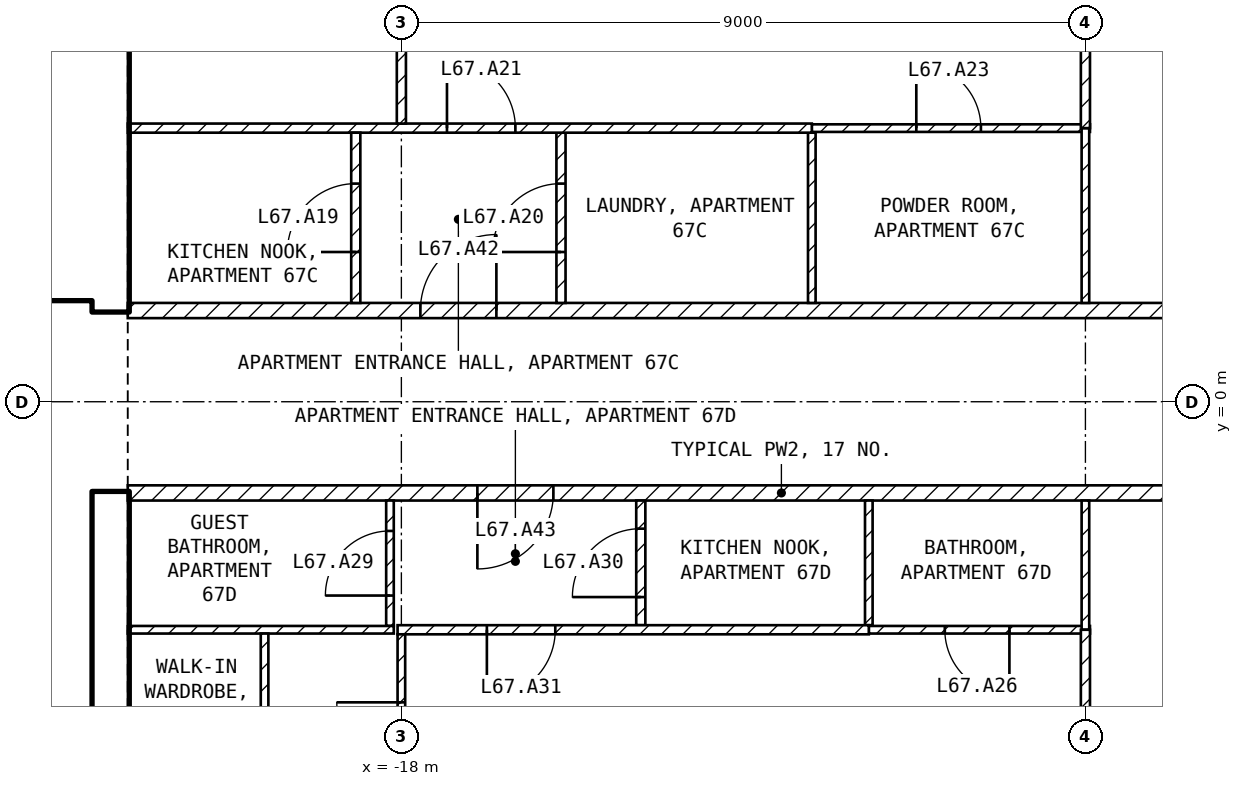
"""IFC4 building model, lengths in metres.
Left out: names, types, materials, properties, quantities, classifications, styles, units other than length and angle.
Written with IfcOpenShell. Run it as: python <this file> out.ifc"""

import sys

from ifc_helpers import new_model, si_unit, direction, frame, frame_2d, origin, place, context, subcontext, project, spatial, rectangle, extrude, element, fill, save


model = new_model("IFC4")
c1 = context("Model", 3, precision=1e-05, world=origin(), true_north=direction((0.0, 1.0)))
c2 = subcontext(c1, "Body", "Model", "MODEL_VIEW")
j1 = project(units=[si_unit("LENGTHUNIT", "METRE"), si_unit("PLANEANGLEUNIT", "RADIAN")], contexts=[c1])
p1 = place(None, origin())
s1 = spatial("IfcSite", under=j1, at=p1, CompositionType="ELEMENT")
p2 = place(p1, origin())
s2 = spatial("IfcBuilding", under=s1, at=p2, CompositionType="ELEMENT")
p3 = place(p2, frame((0.0, 0.0, 264.0)))
s3 = spatial("IfcBuildingStorey", under=s2, at=p3, CompositionType="ELEMENT", Elevation=264.0)
for number, where, z_axis, x_axis in (
    (1, (-21.825, -8.1, 0.0), (0.0, 0.0, 1.0), (0.0, 1.0, 0.0)),
    (2, (-21.825, 1.2, 0.0), (0.0, 0.0, 1.0), (0.0, 1.0, 0.0)),
):
    element("IfcWall", number, at=place(p3, frame(where, z_axis=z_axis, x_axis=x_axis)), inside=s3, PredefinedType="SHEAR", context=c2, shape_type="SweptSolid", body=[
        extrude(rectangle(XDim=6.9, YDim=0.45, at=frame_2d((3.45, 0.0))), origin(), (0.0, 0.0, 1.0), 3.25),
    ])
p4 = place(p3, frame((-33.35, 1.45, 0.0), z_axis=(0.0, 0.0, 1.0), x_axis=(1.0, 0.0, 0.0)))
e3 = element("IfcWall", 3, at=p4, inside=s3, PredefinedType="SOLIDWALL", context=c2, shape_type="SweptSolid", body=[
    extrude(rectangle(XDim=11.3, YDim=0.2, at=frame_2d((5.65, 0.0))), origin(), (0.0, 0.0, 1.0), 3.25),
])
p5 = place(p4, frame((9.55, 0.0, 0.0)))
e4 = element("IfcOpeningElement", 4, at=p5, cuts=e3, PredefinedType="OPENING", context=c2, shape_type="SweptSolid", body=[
    extrude(rectangle(XDim=1.0, YDim=2.1, at=frame_2d((0.5, 1.05))), frame((0.0, 0.11, 0.0), z_axis=(0.0, -1.0, 0.0), x_axis=(1.0, 0.0, 0.0)), (0.0, 0.0, 1.0), 0.22),
])
p6 = place(p4, frame((7.05, 0.0, 0.0)))
e5 = element("IfcOpeningElement", 5, at=p6, cuts=e3, PredefinedType="OPENING", context=c2, shape_type="SweptSolid", body=[
    extrude(rectangle(XDim=1.0, YDim=2.1, at=frame_2d((0.5, 1.05))), frame((0.0, 0.11, 0.0), z_axis=(0.0, -1.0, 0.0), x_axis=(1.0, 0.0, 0.0)), (0.0, 0.0, 1.0), 0.22),
])
p7 = place(p4, frame((1.175, 0.0, 0.0)))
e6 = element("IfcOpeningElement", 6, at=p7, cuts=e3, PredefinedType="OPENING", context=c2, shape_type="SweptSolid", body=[
    extrude(rectangle(XDim=0.9, YDim=2.1, at=frame_2d((0.45, 1.05))), frame((0.0, 0.11, 0.0), z_axis=(0.0, -1.0, 0.0), x_axis=(1.0, 0.0, 0.0)), (0.0, 0.0, 1.0), 0.22),
])
p8 = place(p3, frame((-21.6, 1.2, 0.0), z_axis=(0.0, 0.0, 1.0), x_axis=(1.0, 0.0, 0.0)))
e7 = element("IfcWall", 7, at=p8, inside=s3, PredefinedType="PARTITIONING", context=c2, shape_type="SweptSolid", body=[
    extrude(rectangle(XDim=17.2, YDim=0.2, at=frame_2d((8.6, 0.0))), origin(), (0.0, 0.0, 1.0), 3.25),
])
p9 = place(p8, frame((3.85, 0.0, 0.0)))
e8 = element("IfcOpeningElement", 8, at=p9, cuts=e7, PredefinedType="OPENING", context=c2, shape_type="SweptSolid", body=[
    extrude(rectangle(XDim=1.0, YDim=2.1, at=frame_2d((0.5, 1.05))), frame((0.0, 0.11, 0.0), z_axis=(0.0, -1.0, 0.0), x_axis=(1.0, 0.0, 0.0)), (0.0, 0.0, 1.0), 0.22),
])
p10 = place(p3, frame((-4.4, -1.2, 0.0), z_axis=(0.0, 0.0, 1.0), x_axis=(-1.0, 0.0, 0.0)))
e9 = element("IfcWall", 9, at=p10, inside=s3, PredefinedType="PARTITIONING", context=c2, shape_type="SweptSolid", body=[
    extrude(rectangle(XDim=17.2, YDim=0.2, at=frame_2d((8.6, 0.0))), origin(), (0.0, 0.0, 1.0), 3.25),
])
p11 = place(p10, frame((11.6, 0.0, 0.0)))
e10 = element("IfcOpeningElement", 10, at=p11, cuts=e9, PredefinedType="OPENING", context=c2, shape_type="SweptSolid", body=[
    extrude(rectangle(XDim=1.0, YDim=2.1, at=frame_2d((0.5, 1.05))), frame((0.0, 0.11, 0.0), z_axis=(0.0, -1.0, 0.0), x_axis=(1.0, 0.0, 0.0)), (0.0, 0.0, 1.0), 0.22),
])
p12 = place(p3, frame((-12.6, 1.3, 0.0), z_axis=(0.0, 0.0, 1.0), x_axis=(0.0, 1.0, 0.0)))
e11 = element("IfcWall", 11, at=p12, inside=s3, PredefinedType="PARTITIONING", context=c2, shape_type="SweptSolid", body=[
    extrude(rectangle(XDim=2.24, YDim=0.1, at=frame_2d((1.12, 0.0))), origin(), (0.0, 0.0, 1.0), 3.25),
])
p13 = place(p3, frame((-12.6, 3.6, 0.0), z_axis=(0.0, 0.0, 1.0), x_axis=(1.0, 0.0, 0.0)))
e12 = element("IfcWall", 12, at=p13, inside=s3, PredefinedType="PARTITIONING", context=c2, shape_type="SweptSolid", body=[
    extrude(rectangle(XDim=3.66, YDim=0.1, at=frame_2d((1.83, 0.0))), origin(), (0.0, 0.0, 1.0), 3.25),
])
p14 = place(p13, frame((1.375, 0.0, 0.0)))
e13 = element("IfcOpeningElement", 13, at=p14, cuts=e12, PredefinedType="OPENING", context=c2, shape_type="SweptSolid", body=[
    extrude(rectangle(XDim=0.85, YDim=2.1, at=frame_2d((0.425, 1.05))), frame((0.0, 0.06, 0.0), z_axis=(0.0, -1.0, 0.0), x_axis=(1.0, 0.0, 0.0)), (0.0, 0.0, 1.0), 0.12),
])
p15 = place(p3, frame((-9.0, 3.6, 0.0), z_axis=(0.0, 0.0, 1.0), x_axis=(0.0, -1.0, 0.0)))
e14 = element("IfcWall", 14, at=p15, inside=s3, PredefinedType="PARTITIONING", context=c2, shape_type="SweptSolid", body=[
    extrude(rectangle(XDim=2.3, YDim=0.1, at=frame_2d((1.15, 0.0))), origin(), (0.0, 0.0, 1.0), 3.25),
])
p16 = place(p3, frame((-15.9, 1.3, 0.0), z_axis=(0.0, 0.0, 1.0), x_axis=(0.0, 1.0, 0.0)))
e15 = element("IfcWall", 15, at=p16, inside=s3, PredefinedType="PARTITIONING", context=c2, shape_type="SweptSolid", body=[
    extrude(rectangle(XDim=2.24, YDim=0.12, at=frame_2d((1.12, 0.0))), origin(), (0.0, 0.0, 1.0), 3.25),
])
p17 = place(p16, frame((0.67, 0.0, 0.0)))
e16 = element("IfcOpeningElement", 16, at=p17, cuts=e15, PredefinedType="OPENING", context=c2, shape_type="SweptSolid", body=[
    extrude(rectangle(XDim=0.9, YDim=2.1, at=frame_2d((0.45, 1.05))), frame((0.0, 0.07, 0.0), z_axis=(0.0, -1.0, 0.0), x_axis=(1.0, 0.0, 0.0)), (0.0, 0.0, 1.0), 0.14),
])
p18 = place(p3, frame((-21.6, 3.6, 0.0), z_axis=(0.0, 0.0, 1.0), x_axis=(1.0, 0.0, 0.0)))
e17 = element("IfcWall", 17, at=p18, inside=s3, PredefinedType="PARTITIONING", context=c2, shape_type="SweptSolid", body=[
    extrude(rectangle(XDim=9.0, YDim=0.12, at=frame_2d((4.5, 0.0))), origin(), (0.0, 0.0, 1.0), 3.25),
])
p19 = place(p18, frame((4.2, 0.0, 0.0)))
e18 = element("IfcOpeningElement", 18, at=p19, cuts=e17, PredefinedType="OPENING", context=c2, shape_type="SweptSolid", body=[
    extrude(rectangle(XDim=0.9, YDim=2.1, at=frame_2d((0.45, 1.05))), frame((0.0, 0.07, 0.0), z_axis=(0.0, -1.0, 0.0), x_axis=(1.0, 0.0, 0.0)), (0.0, 0.0, 1.0), 0.14),
])
p20 = place(p3, frame((-18.6, 1.3, 0.0), z_axis=(0.0, 0.0, 1.0), x_axis=(0.0, 1.0, 0.0)))
e19 = element("IfcWall", 19, at=p20, inside=s3, PredefinedType="PARTITIONING", context=c2, shape_type="SweptSolid", body=[
    extrude(rectangle(XDim=2.24, YDim=0.12, at=frame_2d((1.12, 0.0))), origin(), (0.0, 0.0, 1.0), 3.25),
])
p21 = place(p20, frame((0.67, 0.0, 0.0)))
e20 = element("IfcOpeningElement", 20, at=p21, cuts=e19, PredefinedType="OPENING", context=c2, shape_type="SweptSolid", body=[
    extrude(rectangle(XDim=0.9, YDim=2.1, at=frame_2d((0.45, 1.05))), frame((0.0, 0.07, 0.0), z_axis=(0.0, -1.0, 0.0), x_axis=(1.0, 0.0, 0.0)), (0.0, 0.0, 1.0), 0.14),
])
p22 = place(p3, frame((-18.0, 3.66, 0.0), z_axis=(0.0, 0.0, 1.0), x_axis=(0.0, 1.0, 0.0)))
e21 = element("IfcWall", 21, at=p22, inside=s3, PredefinedType="PARTITIONING", context=c2, shape_type="SweptSolid", body=[
    extrude(rectangle(XDim=5.26, YDim=0.12, at=frame_2d((2.63, 0.0))), origin(), (0.0, 0.0, 1.0), 2.496),
])
p23 = place(p22, frame((1.92, 0.0, 0.0)))
e22 = element("IfcOpeningElement", 22, at=p23, cuts=e21, PredefinedType="OPENING", context=c2, shape_type="SweptSolid", body=[
    extrude(rectangle(XDim=0.9, YDim=2.1, at=frame_2d((0.45, 1.05))), frame((0.0, 0.07, 0.0), z_axis=(0.0, -1.0, 0.0), x_axis=(1.0, 0.0, 0.0)), (0.0, 0.0, 1.0), 0.14),
])
p24 = place(p3, frame((-9.0, 8.92, 0.0), z_axis=(0.0, 0.0, 1.0), x_axis=(0.0, -1.0, 0.0)))
e23 = element("IfcWall", 23, at=p24, inside=s3, PredefinedType="PARTITIONING", context=c2, shape_type="SweptSolid", body=[
    extrude(rectangle(XDim=5.32, YDim=0.12, at=frame_2d((2.66, 0.0))), origin(), (0.0, 0.0, 1.0), 3.25),
])
p25 = place(p24, frame((2.42, 0.0, 0.0)))
e24 = element("IfcOpeningElement", 24, at=p25, cuts=e23, PredefinedType="OPENING", context=c2, shape_type="SweptSolid", body=[
    extrude(rectangle(XDim=0.9, YDim=2.1, at=frame_2d((0.45, 1.05))), frame((0.0, 0.07, 0.0), z_axis=(0.0, -1.0, 0.0), x_axis=(1.0, 0.0, 0.0)), (0.0, 0.0, 1.0), 0.14),
])
p26 = place(p3, frame((-11.85, -2.94, 0.0), z_axis=(0.0, 0.0, 1.0), x_axis=(0.0, 1.0, 0.0)))
e25 = element("IfcWall", 25, at=p26, inside=s3, PredefinedType="PARTITIONING", context=c2, shape_type="SweptSolid", body=[
    extrude(rectangle(XDim=1.64, YDim=0.1, at=frame_2d((0.82, 0.0))), origin(), (0.0, 0.0, 1.0), 3.25),
])
p27 = place(p3, frame((-8.94, -3.0, 0.0), z_axis=(0.0, 0.0, 1.0), x_axis=(-1.0, 0.0, 0.0)))
e26 = element("IfcWall", 26, at=p27, inside=s3, PredefinedType="PARTITIONING", context=c2, shape_type="SweptSolid", body=[
    extrude(rectangle(XDim=2.91, YDim=0.1, at=frame_2d((1.455, 0.0))), origin(), (0.0, 0.0, 1.0), 3.25),
])
p28 = place(p27, frame((1.06, 0.0, 0.0)))
e27 = element("IfcOpeningElement", 27, at=p28, cuts=e26, PredefinedType="OPENING", context=c2, shape_type="SweptSolid", body=[
    extrude(rectangle(XDim=0.85, YDim=2.1, at=frame_2d((0.425, 1.05))), frame((0.0, 0.06, 0.0), z_axis=(0.0, -1.0, 0.0), x_axis=(1.0, 0.0, 0.0)), (0.0, 0.0, 1.0), 0.12),
])
p29 = place(p3, frame((-9.0, -1.3, 0.0), z_axis=(0.0, 0.0, 1.0), x_axis=(0.0, -1.0, 0.0)))
e28 = element("IfcWall", 28, at=p29, inside=s3, PredefinedType="PARTITIONING", context=c2, shape_type="SweptSolid", body=[
    extrude(rectangle(XDim=1.7, YDim=0.1, at=frame_2d((0.85, 0.0))), origin(), (0.0, 0.0, 1.0), 3.25),
])
p30 = place(p3, frame((-14.85, -2.94, 0.0), z_axis=(0.0, 0.0, 1.0), x_axis=(0.0, 1.0, 0.0)))
e29 = element("IfcWall", 29, at=p30, inside=s3, PredefinedType="PARTITIONING", context=c2, shape_type="SweptSolid", body=[
    extrude(rectangle(XDim=1.64, YDim=0.12, at=frame_2d((0.82, 0.0))), origin(), (0.0, 0.0, 1.0), 3.25),
])
p31 = place(p30, frame((0.37, 0.0, 0.0)))
e30 = element("IfcOpeningElement", 30, at=p31, cuts=e29, PredefinedType="OPENING", context=c2, shape_type="SweptSolid", body=[
    extrude(rectangle(XDim=0.9, YDim=2.1, at=frame_2d((0.45, 1.05))), frame((0.0, 0.07, 0.0), z_axis=(0.0, -1.0, 0.0), x_axis=(1.0, 0.0, 0.0)), (0.0, 0.0, 1.0), 0.14),
])
p32 = place(p3, frame((-11.85, -3.0, 0.0), z_axis=(0.0, 0.0, 1.0), x_axis=(-1.0, 0.0, 0.0)))
e31 = element("IfcWall", 31, at=p32, inside=s3, PredefinedType="PARTITIONING", context=c2, shape_type="SweptSolid", body=[
    extrude(rectangle(XDim=6.2, YDim=0.12, at=frame_2d((3.1, 0.0))), origin(), (0.0, 0.0, 1.0), 3.25),
])
p33 = place(p32, frame((4.125, 0.0, 0.0)))
e32 = element("IfcOpeningElement", 32, at=p33, cuts=e31, PredefinedType="OPENING", context=c2, shape_type="SweptSolid", body=[
    extrude(rectangle(XDim=0.9, YDim=2.1, at=frame_2d((0.45, 1.05))), frame((0.0, 0.07, 0.0), z_axis=(0.0, -1.0, 0.0), x_axis=(1.0, 0.0, 0.0)), (0.0, 0.0, 1.0), 0.14),
])
p34 = place(p3, frame((-18.15, -2.95, 0.0), z_axis=(0.0, 0.0, 1.0), x_axis=(0.0, 1.0, 0.0)))
e33 = element("IfcWall", 33, at=p34, inside=s3, PredefinedType="PARTITIONING", context=c2, shape_type="SweptSolid", body=[
    extrude(rectangle(XDim=1.65, YDim=0.1, at=frame_2d((0.825, 0.0))), origin(), (0.0, 0.0, 1.0), 2.496),
])
p35 = place(p34, frame((0.4, 0.0, 0.0)))
e34 = element("IfcOpeningElement", 34, at=p35, cuts=e33, PredefinedType="OPENING", context=c2, shape_type="SweptSolid", body=[
    extrude(rectangle(XDim=0.85, YDim=2.1, at=frame_2d((0.425, 1.05))), frame((0.0, 0.06, 0.0), z_axis=(0.0, -1.0, 0.0), x_axis=(1.0, 0.0, 0.0)), (0.0, 0.0, 1.0), 0.12),
])
p36 = place(p3, frame((-18.1, -3.0, 0.0), z_axis=(0.0, 0.0, 1.0), x_axis=(-1.0, 0.0, 0.0)))
e35 = element("IfcWall", 35, at=p36, inside=s3, PredefinedType="PARTITIONING", context=c2, shape_type="SweptSolid", body=[
    extrude(rectangle(XDim=3.5, YDim=0.1, at=frame_2d((1.75, 0.0))), origin(), (0.0, 0.0, 1.0), 3.25),
])
p37 = place(p3, frame((-18.0, -5.7, 0.0), z_axis=(0.0, 0.0, 1.0), x_axis=(0.0, 1.0, 0.0)))
e36 = element("IfcWall", 36, at=p37, inside=s3, PredefinedType="PARTITIONING", context=c2, shape_type="SweptSolid", body=[
    extrude(rectangle(XDim=2.64, YDim=0.1, at=frame_2d((1.32, 0.0))), origin(), (0.0, 0.0, 1.0), 2.496),
])
p38 = place(p37, frame((0.895, 0.0, 0.0)))
e37 = element("IfcOpeningElement", 37, at=p38, cuts=e36, PredefinedType="OPENING", context=c2, shape_type="SweptSolid", body=[
    extrude(rectangle(XDim=0.85, YDim=2.1, at=frame_2d((0.425, 1.05))), frame((0.0, 0.06, 0.0), z_axis=(0.0, -1.0, 0.0), x_axis=(1.0, 0.0, 0.0)), (0.0, 0.0, 1.0), 0.12),
])
p39 = place(p3, frame((-9.0, -3.0, 0.0), z_axis=(0.0, 0.0, 1.0), x_axis=(0.0, -1.0, 0.0)))
e38 = element("IfcWall", 38, at=p39, inside=s3, PredefinedType="PARTITIONING", context=c2, shape_type="SweptSolid", body=[
    extrude(rectangle(XDim=5.92, YDim=0.12, at=frame_2d((2.96, 0.0))), origin(), (0.0, 0.0, 1.0), 3.25),
])
p40 = place(p39, frame((2.4, 0.0, 0.0)))
e39 = element("IfcOpeningElement", 39, at=p40, cuts=e38, PredefinedType="OPENING", context=c2, shape_type="SweptSolid", body=[
    extrude(rectangle(XDim=0.9, YDim=2.1, at=frame_2d((0.45, 1.05))), frame((0.0, 0.07, 0.0), z_axis=(0.0, -1.0, 0.0), x_axis=(1.0, 0.0, 0.0)), (0.0, 0.0, 1.0), 0.14),
])
p41 = place(p3, frame((-19.8, -5.64, 0.0), z_axis=(0.0, 0.0, 1.0), x_axis=(0.0, 1.0, 0.0)))
e40 = element("IfcWall", 40, at=p41, inside=s3, PredefinedType="PARTITIONING", context=c2, shape_type="SweptSolid", body=[
    extrude(rectangle(XDim=2.59, YDim=0.1, at=frame_2d((1.295, 0.0))), origin(), (0.0, 0.0, 1.0), 3.25),
])
p42 = place(p21, origin())
e41 = element("IfcDoor", 41, at=p42, inside=s3, OperationType="SINGLE_SWING_LEFT", PredefinedType="DOOR", context=c2, shape_type="SweptSolid", body=[
    extrude(rectangle(XDim=0.9, YDim=2.1, at=frame_2d((0.45, 1.05))), frame((0.0, 0.025, 0.0), z_axis=(0.0, -1.0, 0.0), x_axis=(1.0, 0.0, 0.0)), (0.0, 0.0, 1.0), 0.05),
])
fill(e20, e41)
p43 = place(p17, origin())
e42 = element("IfcDoor", 42, at=p43, inside=s3, OperationType="SINGLE_SWING_LEFT", PredefinedType="DOOR", context=c2, shape_type="SweptSolid", body=[
    extrude(rectangle(XDim=0.9, YDim=2.1, at=frame_2d((0.45, 1.05))), frame((0.0, 0.025, 0.0), z_axis=(0.0, -1.0, 0.0), x_axis=(1.0, 0.0, 0.0)), (0.0, 0.0, 1.0), 0.05),
])
fill(e16, e42)
p44 = place(p19, origin())
e43 = element("IfcDoor", 43, at=p44, inside=s3, OperationType="SINGLE_SWING_LEFT", PredefinedType="DOOR", context=c2, shape_type="SweptSolid", body=[
    extrude(rectangle(XDim=0.9, YDim=2.1, at=frame_2d((0.45, 1.05))), frame((0.0, 0.025, 0.0), z_axis=(0.0, -1.0, 0.0), x_axis=(1.0, 0.0, 0.0)), (0.0, 0.0, 1.0), 0.05),
])
fill(e18, e43)
p45 = place(p14, origin())
e44 = element("IfcDoor", 44, at=p45, inside=s3, OperationType="SINGLE_SWING_LEFT", PredefinedType="DOOR", context=c2, shape_type="SweptSolid", body=[
    extrude(rectangle(XDim=0.85, YDim=2.1, at=frame_2d((0.425, 1.05))), frame((0.0, 0.025, 0.0), z_axis=(0.0, -1.0, 0.0), x_axis=(1.0, 0.0, 0.0)), (0.0, 0.0, 1.0), 0.05),
])
fill(e13, e44)
p46 = place(p38, origin())
e45 = element("IfcDoor", 45, at=p46, inside=s3, OperationType="SINGLE_SWING_RIGHT", PredefinedType="DOOR", context=c2, shape_type="SweptSolid", body=[
    extrude(rectangle(XDim=0.85, YDim=2.1, at=frame_2d((0.425, 1.05))), frame((0.0, 0.025, 0.0), z_axis=(0.0, -1.0, 0.0), x_axis=(1.0, 0.0, 0.0)), (0.0, 0.0, 1.0), 0.05),
])
fill(e37, e45)
p47 = place(p28, origin())
e46 = element("IfcDoor", 46, at=p47, inside=s3, OperationType="SINGLE_SWING_LEFT", PredefinedType="DOOR", context=c2, shape_type="SweptSolid", body=[
    extrude(rectangle(XDim=0.85, YDim=2.1, at=frame_2d((0.425, 1.05))), frame((0.0, 0.025, 0.0), z_axis=(0.0, -1.0, 0.0), x_axis=(1.0, 0.0, 0.0)), (0.0, 0.0, 1.0), 0.05),
])
fill(e27, e46)
p48 = place(p35, origin())
e47 = element("IfcDoor", 47, at=p48, inside=s3, OperationType="SINGLE_SWING_LEFT", PredefinedType="DOOR", context=c2, shape_type="SweptSolid", body=[
    extrude(rectangle(XDim=0.85, YDim=2.1, at=frame_2d((0.425, 1.05))), frame((0.0, 0.025, 0.0), z_axis=(0.0, -1.0, 0.0), x_axis=(1.0, 0.0, 0.0)), (0.0, 0.0, 1.0), 0.05),
])
fill(e34, e47)
p49 = place(p31, origin())
e48 = element("IfcDoor", 48, at=p49, inside=s3, OperationType="SINGLE_SWING_LEFT", PredefinedType="DOOR", context=c2, shape_type="SweptSolid", body=[
    extrude(rectangle(XDim=0.9, YDim=2.1, at=frame_2d((0.45, 1.05))), frame((0.0, 0.025, 0.0), z_axis=(0.0, -1.0, 0.0), x_axis=(1.0, 0.0, 0.0)), (0.0, 0.0, 1.0), 0.05),
])
fill(e30, e48)
p50 = place(p33, origin())
e49 = element("IfcDoor", 49, at=p50, inside=s3, OperationType="SINGLE_SWING_RIGHT", PredefinedType="DOOR", context=c2, shape_type="SweptSolid", body=[
    extrude(rectangle(XDim=0.9, YDim=2.1, at=frame_2d((0.45, 1.05))), frame((0.0, 0.025, 0.0), z_axis=(0.0, -1.0, 0.0), x_axis=(1.0, 0.0, 0.0)), (0.0, 0.0, 1.0), 0.05),
])
fill(e32, e49)
p51 = place(p9, origin())
e50 = element("IfcDoor", 50, at=p51, inside=s3, OperationType="SINGLE_SWING_RIGHT", PredefinedType="DOOR", context=c2, shape_type="SweptSolid", body=[
    extrude(rectangle(XDim=1.0, YDim=2.1, at=frame_2d((0.5, 1.05))), frame((0.0, 0.025, 0.0), z_axis=(0.0, -1.0, 0.0), x_axis=(1.0, 0.0, 0.0)), (0.0, 0.0, 1.0), 0.05),
])
fill(e8, e50)
p52 = place(p11, origin())
e51 = element("IfcDoor", 51, at=p52, inside=s3, OperationType="SINGLE_SWING_RIGHT", PredefinedType="DOOR", context=c2, shape_type="SweptSolid", body=[
    extrude(rectangle(XDim=1.0, YDim=2.1, at=frame_2d((0.5, 1.05))), frame((0.0, 0.025, 0.0), z_axis=(0.0, -1.0, 0.0), x_axis=(1.0, 0.0, 0.0)), (0.0, 0.0, 1.0), 0.05),
])
fill(e10, e51)
save(model, sys.argv[1])
